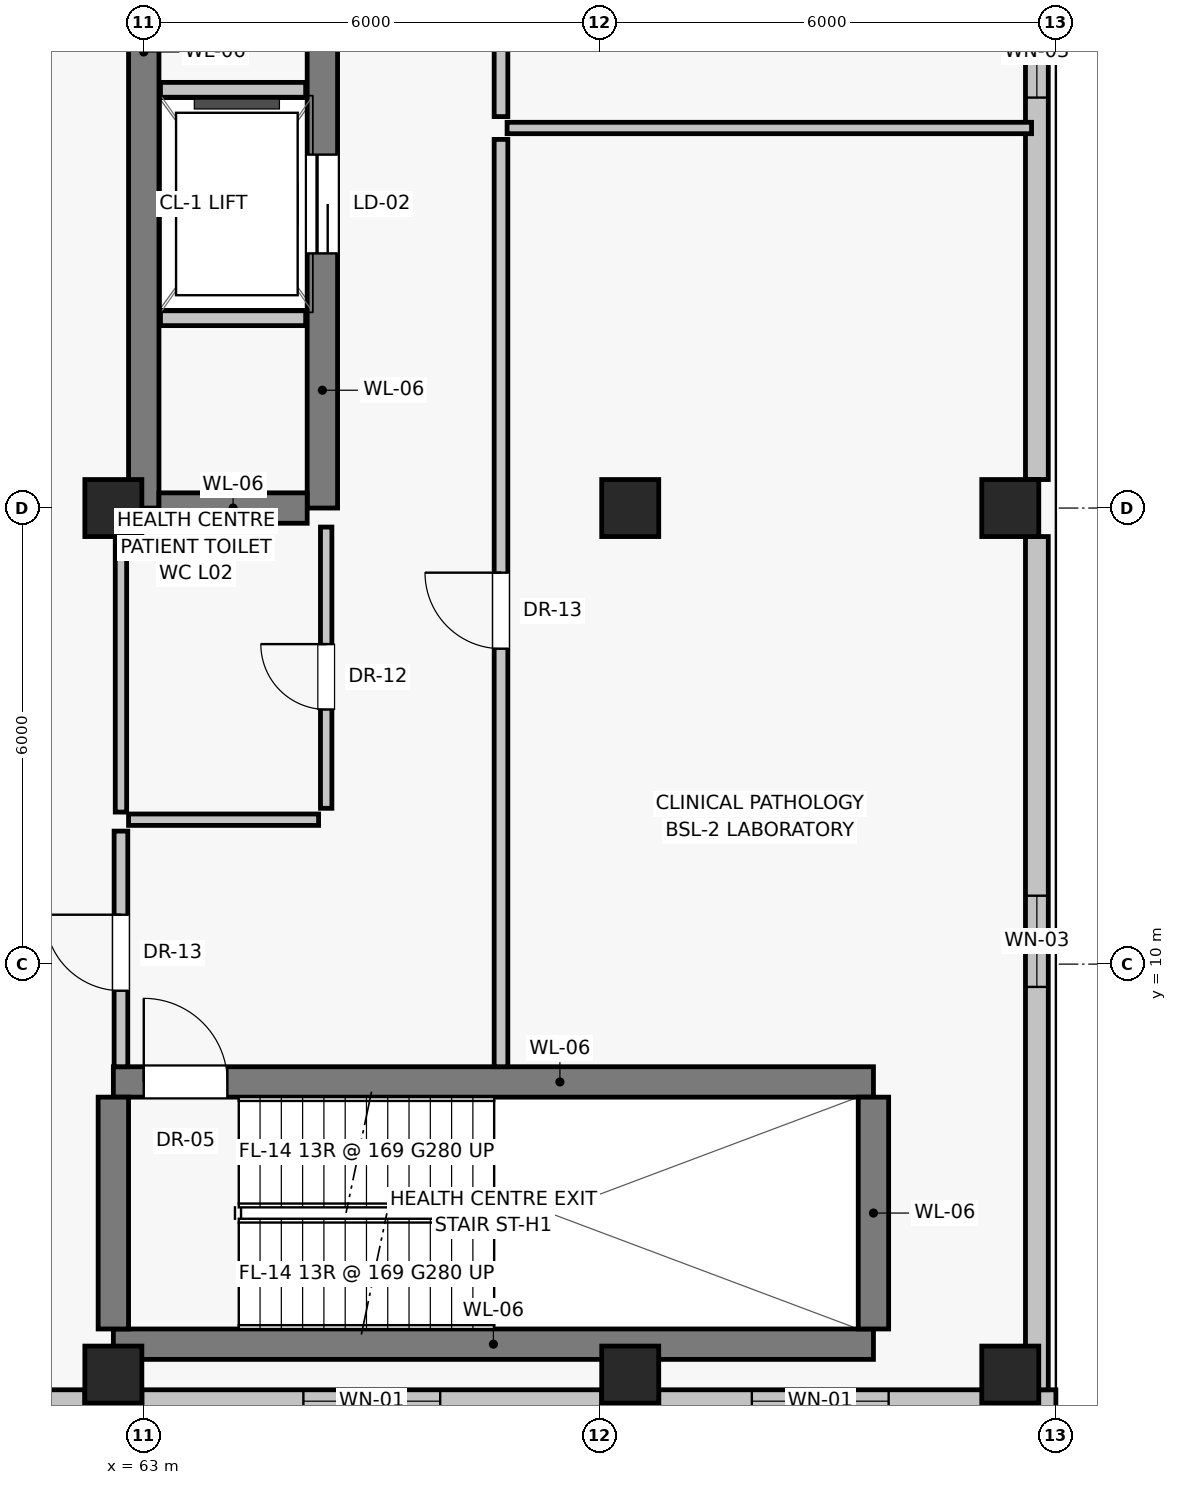
"""IFC4 building model, lengths in metres.
Left out: names, types, materials, properties, quantities, classifications, styles, units other than length and angle.
Written with IfcOpenShell. Run it as: python <this file> out.ifc"""

import sys

from ifc_helpers import new_model, si_unit, direction, frame, frame_2d, origin, origin_2d, place, context, subcontext, project, spatial, rectangle, extrude, source, transform, mapped, element, fill, save


model = new_model("IFC4")
c1 = context("Model", 3, precision=1e-05, world=origin(), true_north=direction((0.0, 1.0)))
c2 = subcontext(c1, "Body", "Model", "MODEL_VIEW")
j1 = project(units=[si_unit("LENGTHUNIT", "METRE"), si_unit("PLANEANGLEUNIT", "RADIAN")], contexts=[c1])
p1 = place(None, origin())
s1 = spatial("IfcSite", under=j1, at=p1, CompositionType="ELEMENT")
p2 = place(p1, origin())
s2 = spatial("IfcBuilding", under=s1, at=p2, CompositionType="ELEMENT")
p3 = place(p2, frame((0.0, 0.0, 9.6)))
s3 = spatial("IfcBuildingStorey", under=s2, at=p3, CompositionType="ELEMENT", Elevation=9.6)
for number, where, z_axis, x_axis in (
    (1, (62.6, 4.6, 0.0), (0.0, 0.0, 1.0), (1.0, 0.0, 0.0)),
    (2, (62.6, 16.0, 0.0), (0.0, 0.0, 1.0), (1.0, 0.0, 0.0)),
    (3, (69.4, 4.6, 0.0), (0.0, 0.0, 1.0), (1.0, 0.0, 0.0)),
    (4, (69.4, 16.0, 0.0), (0.0, 0.0, 1.0), (1.0, 0.0, 0.0)),
    (5, (74.4, 4.6, 0.0), (0.0, 0.0, 1.0), (1.0, 0.0, 0.0)),
    (6, (74.4, 16.0, 0.0), (0.0, 0.0, 1.0), (1.0, 0.0, 0.0)),
):
    element("IfcColumn", number, at=place(p3, frame(where, z_axis=z_axis, x_axis=x_axis)), inside=s3, PredefinedType="COLUMN", context=c2, shape_type="SweptSolid", body=[
        extrude(rectangle(XDim=0.75, YDim=0.75, at=origin_2d()), origin(), (0.0, 0.0, 1.0), 4.4),
    ])
p4 = place(p3, frame((57.0, 4.25, 0.0), z_axis=(0.0, 0.0, 1.0), x_axis=(1.0, 0.0, 0.0)))
e7 = element("IfcWall", 7, at=p4, inside=s3, PredefinedType="SOLIDWALL", context=c2, shape_type="SweptSolid", body=[
    extrude(rectangle(XDim=5.225, YDim=0.3, at=frame_2d((2.613, 0.0))), origin(), (0.0, 0.0, 1.0), 3.35),
])
p5 = place(p4, frame((2.2, 0.0, 0.85)))
e8 = element("IfcOpeningElement", 8, at=p5, cuts=e7, PredefinedType="OPENING", context=c2, shape_type="SweptSolid", body=[
    extrude(rectangle(XDim=1.8, YDim=1.65, at=frame_2d((0.9, 0.825))), frame((0.0, 0.16, 0.0), z_axis=(0.0, -1.0, 0.0), x_axis=(1.0, 0.0, 0.0)), (0.0, 0.0, 1.0), 0.32),
])
p6 = place(p3, frame((62.975, 4.25, 0.0), z_axis=(0.0, 0.0, 1.0), x_axis=(1.0, 0.0, 0.0)))
e9 = element("IfcWall", 9, at=p6, inside=s3, PredefinedType="SOLIDWALL", context=c2, shape_type="SweptSolid", body=[
    extrude(rectangle(XDim=6.05, YDim=0.3, at=frame_2d((3.025, 0.0))), origin(), (0.0, 0.0, 1.0), 3.35),
])
p7 = place(p6, frame((2.125, 0.0, 0.85)))
e10 = element("IfcOpeningElement", 10, at=p7, cuts=e9, PredefinedType="OPENING", context=c2, shape_type="SweptSolid", body=[
    extrude(rectangle(XDim=1.8, YDim=1.65, at=frame_2d((0.9, 0.825))), frame((0.0, 0.16, 0.0), z_axis=(0.0, -1.0, 0.0), x_axis=(1.0, 0.0, 0.0)), (0.0, 0.0, 1.0), 0.32),
])
p8 = place(p3, frame((69.775, 4.25, 0.0), z_axis=(0.0, 0.0, 1.0), x_axis=(1.0, 0.0, 0.0)))
e11 = element("IfcWall", 11, at=p8, inside=s3, PredefinedType="SOLIDWALL", context=c2, shape_type="SweptSolid", body=[
    extrude(rectangle(XDim=5.225, YDim=0.3, at=frame_2d((2.613, 0.0))), origin(), (0.0, 0.0, 1.0), 3.35),
])
p9 = place(p8, frame((1.225, 0.0, 0.85)))
e12 = element("IfcOpeningElement", 12, at=p9, cuts=e11, PredefinedType="OPENING", context=c2, shape_type="SweptSolid", body=[
    extrude(rectangle(XDim=1.8, YDim=1.65, at=frame_2d((0.9, 0.825))), frame((0.0, 0.16, 0.0), z_axis=(0.0, -1.0, 0.0), x_axis=(1.0, 0.0, 0.0)), (0.0, 0.0, 1.0), 0.32),
])
p10 = place(p3, frame((74.75, 4.4, 0.0), z_axis=(0.0, 0.0, 1.0), x_axis=(0.0, 1.0, 0.0)))
e13 = element("IfcWall", 13, at=p10, inside=s3, PredefinedType="SOLIDWALL", context=c2, shape_type="SweptSolid", body=[
    extrude(rectangle(XDim=11.225, YDim=0.3, at=frame_2d((5.613, 0.0))), origin(), (0.0, 0.0, 1.0), 3.35),
])
p11 = place(p10, frame((5.3, 0.0, 0.95)))
e14 = element("IfcOpeningElement", 14, at=p11, cuts=e13, PredefinedType="OPENING", context=c2, shape_type="SweptSolid", body=[
    extrude(rectangle(XDim=1.2, YDim=1.5, at=frame_2d((0.6, 0.75))), frame((0.0, 0.16, 0.0), z_axis=(0.0, -1.0, 0.0), x_axis=(1.0, 0.0, 0.0)), (0.0, 0.0, 1.0), 0.32),
])
p12 = place(p3, frame((74.75, 16.375, 0.0), z_axis=(0.0, 0.0, 1.0), x_axis=(0.0, 1.0, 0.0)))
e15 = element("IfcWall", 15, at=p12, inside=s3, PredefinedType="SOLIDWALL", context=c2, shape_type="SweptSolid", body=[
    extrude(rectangle(XDim=11.25, YDim=0.3, at=frame_2d((5.625, 0.0))), origin(), (0.0, 0.0, 1.0), 3.35),
])
p13 = place(p12, frame((5.025, 0.0, 0.95)))
e16 = element("IfcOpeningElement", 16, at=p13, cuts=e15, PredefinedType="OPENING", context=c2, shape_type="SweptSolid", body=[
    extrude(rectangle(XDim=1.2, YDim=1.5, at=frame_2d((0.6, 0.75))), frame((0.0, 0.16, 0.0), z_axis=(0.0, -1.0, 0.0), x_axis=(1.0, 0.0, 0.0)), (0.0, 0.0, 1.0), 0.32),
])
p14 = place(p3, frame((63.0, 16.0, 0.0), z_axis=(0.0, 0.0, 1.0), x_axis=(0.0, 1.0, 0.0)))
e17 = element("IfcWall", 17, at=p14, inside=s3, PredefinedType="SHEAR", context=c2, shape_type="SweptSolid", body=[
    extrude(rectangle(XDim=12.0, YDim=0.4, at=frame_2d((6.0, 0.0))), origin(), (0.0, 0.0, 1.0), 4.1),
])
p15 = place(p3, frame((65.35, 16.0, 0.0), z_axis=(0.0, 0.0, 1.0), x_axis=(0.0, 1.0, 0.0)))
e18 = element("IfcWall", 18, at=p15, inside=s3, PredefinedType="SHEAR", context=c2, shape_type="SweptSolid", body=[
    extrude(rectangle(XDim=12.0, YDim=0.4, at=frame_2d((6.0, 0.0))), origin(), (0.0, 0.0, 1.0), 4.1),
])
p16 = place(p15, frame((3.35, 0.0, 0.0)))
e19 = element("IfcOpeningElement", 19, at=p16, cuts=e18, PredefinedType="OPENING", context=c2, shape_type="SweptSolid", body=[
    extrude(rectangle(XDim=1.3, YDim=2.25, at=frame_2d((0.65, 1.125))), frame((0.0, 0.21, 0.0), z_axis=(0.0, -1.0, 0.0), x_axis=(1.0, 0.0, 0.0)), (0.0, 0.0, 1.0), 0.42),
])
p17 = place(p15, frame((7.35, 0.0, 0.0)))
e20 = element("IfcOpeningElement", 20, at=p17, cuts=e18, PredefinedType="OPENING", context=c2, shape_type="SweptSolid", body=[
    extrude(rectangle(XDim=1.3, YDim=2.25, at=frame_2d((0.65, 1.125))), frame((0.0, 0.21, 0.0), z_axis=(0.0, -1.0, 0.0), x_axis=(1.0, 0.0, 0.0)), (0.0, 0.0, 1.0), 0.42),
])
p18 = place(p3, frame((63.2, 16.0, 0.0), z_axis=(0.0, 0.0, 1.0), x_axis=(1.0, 0.0, 0.0)))
e21 = element("IfcWall", 21, at=p18, inside=s3, PredefinedType="SHEAR", context=c2, shape_type="SweptSolid", body=[
    extrude(rectangle(XDim=1.95, YDim=0.4, at=frame_2d((0.975, 0.0))), origin(), (0.0, 0.0, 1.0), 4.1),
])
for number, where, z_axis, x_axis in (
    (22, (63.22, 18.5, 0.0), (0.0, 0.0, 1.0), (1.0, 0.0, 0.0)),
    (23, (63.22, 21.5, 0.0), (0.0, 0.0, 1.0), (1.0, 0.0, 0.0)),
):
    element("IfcWall", number, at=place(p3, frame(where, z_axis=z_axis, x_axis=x_axis)), inside=s3, PredefinedType="SOLIDWALL", context=c2, shape_type="SweptSolid", body=[
        extrude(rectangle(XDim=1.91, YDim=0.2, at=frame_2d((0.955, 0.0))), origin(), (0.0, 0.0, 1.0), 4.1),
    ])
p19 = place(p3, frame((62.6, 5.0, 0.0), z_axis=(0.0, 0.0, 1.0), x_axis=(1.0, 0.0, 0.0)))
e24 = element("IfcWall", 24, at=p19, inside=s3, PredefinedType="SHEAR", context=c2, shape_type="SweptSolid", body=[
    extrude(rectangle(XDim=10.0, YDim=0.4, at=frame_2d((5.0, 0.0))), origin(), (0.0, 0.0, 1.0), 4.1),
])
p20 = place(p3, frame((62.6, 8.45, 0.0), z_axis=(0.0, 0.0, 1.0), x_axis=(1.0, 0.0, 0.0)))
e25 = element("IfcWall", 25, at=p20, inside=s3, PredefinedType="SHEAR", context=c2, shape_type="SweptSolid", body=[
    extrude(rectangle(XDim=10.0, YDim=0.4, at=frame_2d((5.0, 0.0))), origin(), (0.0, 0.0, 1.0), 4.1),
])
p21 = place(p20, frame((0.4, 0.0, 0.0)))
e26 = element("IfcOpeningElement", 26, at=p21, cuts=e25, PredefinedType="OPENING", context=c2, shape_type="SweptSolid", body=[
    extrude(rectangle(XDim=1.1, YDim=2.03, at=frame_2d((0.55, 1.015))), frame((0.0, 0.21, 0.0), z_axis=(0.0, -1.0, 0.0), x_axis=(1.0, 0.0, 0.0)), (0.0, 0.0, 1.0), 0.42),
])
for number, where, z_axis, x_axis in (
    (27, (62.6, 5.2, 0.0), (0.0, 0.0, 1.0), (0.0, 1.0, 0.0)),
    (28, (72.6, 5.2, 0.0), (0.0, 0.0, 1.0), (0.0, 1.0, 0.0)),
):
    element("IfcWall", number, at=place(p3, frame(where, z_axis=z_axis, x_axis=x_axis)), inside=s3, PredefinedType="SHEAR", context=c2, shape_type="SweptSolid", body=[
        extrude(rectangle(XDim=3.05, YDim=0.4, at=frame_2d((1.525, 0.0))), origin(), (0.0, 0.0, 1.0), 4.1),
    ])
p22 = place(p3, frame((62.8, 11.9, 0.0), z_axis=(0.0, 0.0, 1.0), x_axis=(1.0, 0.0, 0.0)))
e29 = element("IfcWall", 29, at=p22, inside=s3, PredefinedType="PARTITIONING", context=c2, shape_type="SweptSolid", body=[
    extrude(rectangle(XDim=2.5, YDim=0.15, at=frame_2d((1.25, 0.0))), origin(), (0.0, 0.0, 1.0), 4.1),
])
p23 = place(p3, frame((62.7, 12.0, 0.0), z_axis=(0.0, 0.0, 1.0), x_axis=(0.0, 1.0, 0.0)))
e30 = element("IfcWall", 30, at=p23, inside=s3, PredefinedType="PARTITIONING", context=c2, shape_type="SweptSolid", body=[
    extrude(rectangle(XDim=3.8, YDim=0.15, at=frame_2d((1.9, 0.0))), origin(), (0.0, 0.0, 1.0), 3.5),
])
p24 = place(p3, frame((65.4, 12.05, 0.0), z_axis=(0.0, 0.0, 1.0), x_axis=(0.0, 1.0, 0.0)))
e31 = element("IfcWall", 31, at=p24, inside=s3, PredefinedType="PARTITIONING", context=c2, shape_type="SweptSolid", body=[
    extrude(rectangle(XDim=3.7, YDim=0.15, at=frame_2d((1.85, 0.0))), origin(), (0.0, 0.0, 1.0), 4.1),
])
p25 = place(p24, frame((1.3, 0.0, 0.0)))
e32 = element("IfcOpeningElement", 32, at=p25, cuts=e31, PredefinedType="OPENING", context=c2, shape_type="SweptSolid", body=[
    extrude(rectangle(XDim=0.86, YDim=2.01, at=frame_2d((0.43, 1.005))), frame((0.0, 0.085, 0.0), z_axis=(0.0, -1.0, 0.0), x_axis=(1.0, 0.0, 0.0)), (0.0, 0.0, 1.0), 0.17),
])
p26 = place(p3, frame((62.7, 8.65, 0.0), z_axis=(0.0, 0.0, 1.0), x_axis=(0.0, 1.0, 0.0)))
e33 = element("IfcWall", 33, at=p26, inside=s3, PredefinedType="PARTITIONING", context=c2, shape_type="SweptSolid", body=[
    extrude(rectangle(XDim=3.1, YDim=0.18, at=frame_2d((1.55, 0.0))), origin(), (0.0, 0.0, 1.0), 3.5),
])
p27 = place(p26, frame((1.0, 0.0, 0.0)))
e34 = element("IfcOpeningElement", 34, at=p27, cuts=e33, PredefinedType="OPENING", context=c2, shape_type="SweptSolid", body=[
    extrude(rectangle(XDim=1.0, YDim=2.01, at=frame_2d((0.5, 1.005))), frame((0.0, 0.1, 0.0), z_axis=(0.0, -1.0, 0.0), x_axis=(1.0, 0.0, 0.0)), (0.0, 0.0, 1.0), 0.2),
])
p28 = place(p3, frame((67.7, 8.65, 0.0), z_axis=(0.0, 0.0, 1.0), x_axis=(0.0, 1.0, 0.0)))
e35 = element("IfcWall", 35, at=p28, inside=s3, PredefinedType="PARTITIONING", context=c2, shape_type="SweptSolid", body=[
    extrude(rectangle(XDim=12.2, YDim=0.18, at=frame_2d((6.1, 0.0))), origin(), (0.0, 0.0, 1.0), 4.1),
])
p29 = place(p28, frame((5.5, 0.0, 0.0)))
e36 = element("IfcOpeningElement", 36, at=p29, cuts=e35, PredefinedType="OPENING", context=c2, shape_type="SweptSolid", body=[
    extrude(rectangle(XDim=1.0, YDim=2.01, at=frame_2d((0.5, 1.005))), frame((0.0, 0.1, 0.0), z_axis=(0.0, -1.0, 0.0), x_axis=(1.0, 0.0, 0.0)), (0.0, 0.0, 1.0), 0.2),
])
p30 = place(p3, frame((67.7, 21.15, 0.0), z_axis=(0.0, 0.0, 1.0), x_axis=(0.0, 1.0, 0.0)))
e37 = element("IfcWall", 37, at=p30, inside=s3, PredefinedType="PARTITIONING", context=c2, shape_type="SweptSolid", body=[
    extrude(rectangle(XDim=18.2, YDim=0.18, at=frame_2d((9.1, 0.0))), origin(), (0.0, 0.0, 1.0), 4.1),
])
p31 = place(p30, frame((5.5, 0.0, 0.0)))
e38 = element("IfcOpeningElement", 38, at=p31, cuts=e37, PredefinedType="OPENING", context=c2, shape_type="SweptSolid", body=[
    extrude(rectangle(XDim=1.0, YDim=2.01, at=frame_2d((0.5, 1.005))), frame((0.0, 0.1, 0.0), z_axis=(0.0, -1.0, 0.0), x_axis=(1.0, 0.0, 0.0)), (0.0, 0.0, 1.0), 0.2),
])
p32 = place(p3, frame((67.78, 21.0, 0.0), z_axis=(0.0, 0.0, 1.0), x_axis=(1.0, 0.0, 0.0)))
e39 = element("IfcWall", 39, at=p32, inside=s3, PredefinedType="PARTITIONING", context=c2, shape_type="SweptSolid", body=[
    extrude(rectangle(XDim=6.9, YDim=0.15, at=frame_2d((3.45, 0.0))), origin(), (0.0, 0.0, 1.0), 4.1),
])
m1 = source(origin(), c2, "Body", "SweptSolid", [
    extrude(rectangle(XDim=1.8, YDim=1.65, at=frame_2d((0.9, 0.825))), frame((0.0, 0.03, 0.0), z_axis=(0.0, -1.0, 0.0), x_axis=(1.0, 0.0, 0.0)), (0.0, 0.0, 1.0), 0.06),
])
p33 = place(p7, origin())
e40 = element("IfcWindow", 40, at=p33, inside=s3, PartitioningType="DOUBLE_PANEL_VERTICAL", PredefinedType="WINDOW", context=c2, shape_type="MappedRepresentation", body=[
    mapped(m1, transform((0.0, 0.0, 0.0), scale=1.0)),
])
fill(e10, e40)
p34 = place(p9, origin())
e41 = element("IfcWindow", 41, at=p34, inside=s3, PartitioningType="DOUBLE_PANEL_VERTICAL", PredefinedType="WINDOW", context=c2, shape_type="MappedRepresentation", body=[
    mapped(m1, transform((0.0, 0.0, 0.0), scale=1.0)),
])
fill(e12, e41)
m2 = source(origin(), c2, "Body", "SweptSolid", [
    extrude(rectangle(XDim=1.2, YDim=1.5, at=frame_2d((0.6, 0.75))), frame((0.0, 0.03, 0.0), z_axis=(0.0, -1.0, 0.0), x_axis=(1.0, 0.0, 0.0)), (0.0, 0.0, 1.0), 0.06),
])
p35 = place(p11, origin())
e42 = element("IfcWindow", 42, at=p35, inside=s3, PartitioningType="SINGLE_PANEL", PredefinedType="WINDOW", context=c2, shape_type="MappedRepresentation", body=[
    mapped(m2, transform((0.0, 0.0, 0.0), scale=1.0)),
])
fill(e14, e42)
p36 = place(p13, origin())
e43 = element("IfcWindow", 43, at=p36, inside=s3, PartitioningType="SINGLE_PANEL", PredefinedType="WINDOW", context=c2, shape_type="MappedRepresentation", body=[
    mapped(m2, transform((0.0, 0.0, 0.0), scale=1.0)),
])
fill(e16, e43)
m3 = source(origin(), c2, "Body", "SweptSolid", [
    extrude(rectangle(XDim=1.3, YDim=2.25, at=frame_2d((0.65, 1.125))), frame((0.0, 0.025, 0.0), z_axis=(0.0, -1.0, 0.0), x_axis=(1.0, 0.0, 0.0)), (0.0, 0.0, 1.0), 0.05),
])
p37 = place(p16, origin())
e44 = element("IfcDoor", 44, at=p37, inside=s3, OperationType="SLIDING_TO_LEFT", PredefinedType="DOOR", context=c2, shape_type="MappedRepresentation", body=[
    mapped(m3, transform((0.0, 0.0, 0.0), scale=1.0)),
])
fill(e19, e44)
m4 = source(origin(), c2, "Body", "SweptSolid", [
    extrude(rectangle(XDim=1.1, YDim=2.03, at=frame_2d((0.55, 1.015))), frame((0.0, 0.025, 0.0), z_axis=(0.0, -1.0, 0.0), x_axis=(1.0, 0.0, 0.0)), (0.0, 0.0, 1.0), 0.05),
])
p38 = place(p21, origin())
e45 = element("IfcDoor", 45, at=p38, inside=s3, OperationType="SINGLE_SWING_LEFT", PredefinedType="DOOR", context=c2, shape_type="MappedRepresentation", body=[
    mapped(m4, transform((0.0, 0.0, 0.0), scale=1.0)),
])
fill(e26, e45)
m5 = source(origin(), c2, "Body", "SweptSolid", [
    extrude(rectangle(XDim=0.86, YDim=2.01, at=frame_2d((0.43, 1.005))), frame((0.0, 0.025, 0.0), z_axis=(0.0, -1.0, 0.0), x_axis=(1.0, 0.0, 0.0)), (0.0, 0.0, 1.0), 0.05),
])
p39 = place(p25, origin())
e46 = element("IfcDoor", 46, at=p39, inside=s3, OperationType="SINGLE_SWING_RIGHT", PredefinedType="DOOR", context=c2, shape_type="MappedRepresentation", body=[
    mapped(m5, transform((0.0, 0.0, 0.0), scale=1.0)),
])
fill(e32, e46)
m6 = source(origin(), c2, "Body", "SweptSolid", [
    extrude(rectangle(XDim=1.0, YDim=2.01, at=frame_2d((0.5, 1.005))), frame((0.0, 0.025, 0.0), z_axis=(0.0, -1.0, 0.0), x_axis=(1.0, 0.0, 0.0)), (0.0, 0.0, 1.0), 0.05),
])
p40 = place(p27, origin())
e47 = element("IfcDoor", 47, at=p40, inside=s3, OperationType="SINGLE_SWING_RIGHT", PredefinedType="DOOR", context=c2, shape_type="MappedRepresentation", body=[
    mapped(m6, transform((0.0, 0.0, 0.0), scale=1.0)),
])
fill(e34, e47)
p41 = place(p29, origin())
e48 = element("IfcDoor", 48, at=p41, inside=s3, OperationType="SINGLE_SWING_RIGHT", PredefinedType="DOOR", context=c2, shape_type="MappedRepresentation", body=[
    mapped(m6, transform((0.0, 0.0, 0.0), scale=1.0)),
])
fill(e36, e48)
save(model, sys.argv[1])
